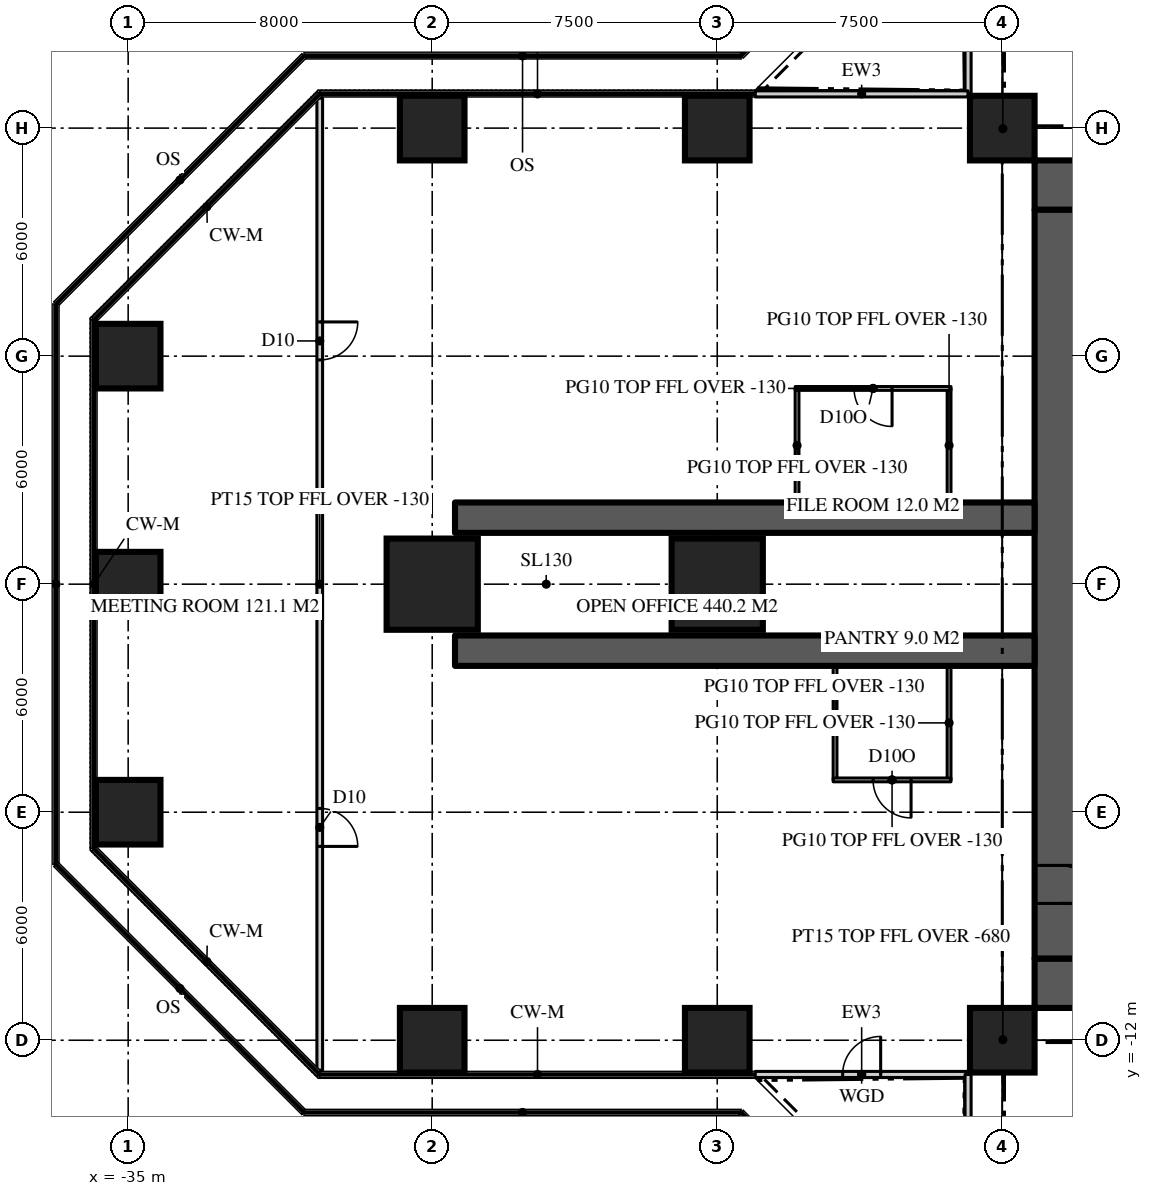
"""IFC4 building model, lengths in metres.
Left out: names, types, materials, properties, quantities, classifications, styles, units other than length and angle.
Written with IfcOpenShell. Run it as: python <this file> out.ifc"""

import sys

from ifc_helpers import new_model, si_unit, direction, frame, frame_2d, origin, origin_2d, place, context, subcontext, project, spatial, rectangle, extrude, element, fill, save


model = new_model("IFC4")
c1 = context("Model", 3, precision=1e-05, world=origin(), true_north=direction((0.0, 1.0)))
c2 = subcontext(c1, "Body", "Model", "MODEL_VIEW")
j1 = project(units=[si_unit("LENGTHUNIT", "METRE"), si_unit("PLANEANGLEUNIT", "RADIAN")], contexts=[c1])
p1 = place(None, origin())
s1 = spatial("IfcSite", under=j1, at=p1, CompositionType="ELEMENT")
p2 = place(p1, origin())
s2 = spatial("IfcBuilding", under=s1, at=p2, CompositionType="ELEMENT")
p3 = place(p2, frame((0.0, 0.0, 124.2)))
s3 = spatial("IfcBuildingStorey", under=s2, at=p3, CompositionType="ELEMENT", Elevation=124.2)
p4 = place(p3, frame((-11.15, 10.5, 0.0), z_axis=(0.0, 0.0, 1.0), x_axis=(1.0, 0.0, 0.0)))
e1 = element("IfcWall", 1, at=p4, inside=s3, PredefinedType="SHEAR", context=c2, shape_type="SweptSolid", body=[
    extrude(rectangle(XDim=22.3, YDim=1.3, at=frame_2d((11.15, 0.0))), origin(), (0.0, 0.0, 1.0), 3.9),
])
p5 = place(p4, frame((4.25, 0.0, 0.0)))
e2 = element("IfcOpeningElement", 2, at=p5, cuts=e1, PredefinedType="OPENING", context=c2, shape_type="SweptSolid", body=[
    extrude(rectangle(XDim=1.8, YDim=2.2, at=frame_2d((0.9, 1.1))), frame((0.0, 0.66, 0.0), z_axis=(0.0, -1.0, 0.0), x_axis=(1.0, 0.0, 0.0)), (0.0, 0.0, 1.0), 1.32),
])
p6 = place(p4, frame((16.25, 0.0, 0.0)))
e3 = element("IfcOpeningElement", 3, at=p6, cuts=e1, PredefinedType="OPENING", context=c2, shape_type="SweptSolid", body=[
    extrude(rectangle(XDim=1.8, YDim=2.2, at=frame_2d((0.9, 1.1))), frame((0.0, 0.66, 0.0), z_axis=(0.0, -1.0, 0.0), x_axis=(1.0, 0.0, 0.0)), (0.0, 0.0, 1.0), 1.32),
])
p7 = place(p3, frame((11.15, -10.5, 0.0), z_axis=(0.0, 0.0, 1.0), x_axis=(-1.0, 0.0, 0.0)))
e4 = element("IfcWall", 4, at=p7, inside=s3, PredefinedType="SHEAR", context=c2, shape_type="SweptSolid", body=[
    extrude(rectangle(XDim=22.3, YDim=1.3, at=frame_2d((11.15, 0.0))), origin(), (0.0, 0.0, 1.0), 3.9),
])
p8 = place(p7, frame((16.25, 0.0, 0.0)))
e5 = element("IfcOpeningElement", 5, at=p8, cuts=e4, PredefinedType="OPENING", context=c2, shape_type="SweptSolid", body=[
    extrude(rectangle(XDim=1.8, YDim=2.2, at=frame_2d((0.9, 1.1))), frame((0.0, 0.66, 0.0), z_axis=(0.0, -1.0, 0.0), x_axis=(1.0, 0.0, 0.0)), (0.0, 0.0, 1.0), 1.32),
])
p9 = place(p7, frame((4.25, 0.0, 0.0)))
e6 = element("IfcOpeningElement", 6, at=p9, cuts=e4, PredefinedType="OPENING", context=c2, shape_type="SweptSolid", body=[
    extrude(rectangle(XDim=1.8, YDim=2.2, at=frame_2d((0.9, 1.1))), frame((0.0, 0.66, 0.0), z_axis=(0.0, -1.0, 0.0), x_axis=(1.0, 0.0, 0.0)), (0.0, 0.0, 1.0), 1.32),
])
p10 = place(p3, frame((-10.5, 9.85, 0.0), z_axis=(0.0, 0.0, 1.0), x_axis=(0.0, -1.0, 0.0)))
e7 = element("IfcWall", 7, at=p10, inside=s3, PredefinedType="SHEAR", context=c2, shape_type="SweptSolid", body=[
    extrude(rectangle(XDim=19.7, YDim=1.3, at=frame_2d((9.85, 0.0))), origin(), (0.0, 0.0, 1.0), 3.9),
])
p11 = place(p10, frame((17.25, 0.0, 0.0)))
e8 = element("IfcOpeningElement", 8, at=p11, cuts=e7, PredefinedType="OPENING", context=c2, shape_type="SweptSolid", body=[
    extrude(rectangle(XDim=1.0, YDim=2.2, at=frame_2d((0.5, 1.1))), frame((0.0, 0.66, 0.0), z_axis=(0.0, -1.0, 0.0), x_axis=(1.0, 0.0, 0.0)), (0.0, 0.0, 1.0), 1.32),
])
for number, where, z_axis, x_axis in (
    (9, (-11.15, 1.75, 0.0), (0.0, 0.0, 1.0), (-1.0, 0.0, 0.0)),
    (10, (-11.15, -1.75, 0.0), (0.0, 0.0, 1.0), (-1.0, 0.0, 0.0)),
):
    element("IfcWall", number, at=place(p3, frame(where, z_axis=z_axis, x_axis=x_axis)), inside=s3, PredefinedType="SHEAR", context=c2, shape_type="SweptSolid", body=[
        extrude(rectangle(XDim=15.25, YDim=0.8, at=frame_2d((7.625, 0.0))), origin(), (0.0, 0.0, 1.0), 3.9),
    ])
for number, where, z_axis, x_axis in (
    (11, (-27.0, -12.0, 0.0), (0.0, 0.0, 1.0), (1.0, 0.0, 0.0)),
    (12, (-19.5, -12.0, 0.0), (0.0, 0.0, 1.0), (1.0, 0.0, 0.0)),
    (13, (-12.0, -12.0, 0.0), (0.0, 0.0, 1.0), (1.0, 0.0, 0.0)),
    (14, (-35.0, -6.0, 0.0), (0.0, 0.0, 1.0), (1.0, 0.0, 0.0)),
    (15, (-35.0, 0.0, 0.0), (0.0, 0.0, 1.0), (1.0, 0.0, 0.0)),
):
    element("IfcColumn", number, at=place(p3, frame(where, z_axis=z_axis, x_axis=x_axis)), inside=s3, PredefinedType="COLUMN", context=c2, shape_type="SweptSolid", body=[
        extrude(rectangle(XDim=1.7, YDim=1.7, at=origin_2d()), origin(), (0.0, 0.0, 1.0), 3.9),
    ])
for number, where, z_axis, x_axis in (
    (16, (-27.0, 0.0, 0.0), (0.0, 0.0, 1.0), (1.0, 0.0, 0.0)),
    (17, (-19.5, 0.0, 0.0), (0.0, 0.0, 1.0), (1.0, 0.0, 0.0)),
):
    element("IfcColumn", number, at=place(p3, frame(where, z_axis=z_axis, x_axis=x_axis)), inside=s3, PredefinedType="COLUMN", context=c2, shape_type="SweptSolid", body=[
        extrude(rectangle(XDim=2.4, YDim=2.4, at=origin_2d()), origin(), (0.0, 0.0, 1.0), 3.9),
    ])
for number, where, z_axis, x_axis in (
    (18, (-35.0, 6.0, 0.0), (0.0, 0.0, 1.0), (1.0, 0.0, 0.0)),
    (19, (-27.0, 12.0, 0.0), (0.0, 0.0, 1.0), (1.0, 0.0, 0.0)),
    (20, (-19.5, 12.0, 0.0), (0.0, 0.0, 1.0), (1.0, 0.0, 0.0)),
    (21, (-12.0, 12.0, 0.0), (0.0, 0.0, 1.0), (1.0, 0.0, 0.0)),
):
    element("IfcColumn", number, at=place(p3, frame(where, z_axis=z_axis, x_axis=x_axis)), inside=s3, PredefinedType="COLUMN", context=c2, shape_type="SweptSolid", body=[
        extrude(rectangle(XDim=1.7, YDim=1.7, at=origin_2d()), origin(), (0.0, 0.0, 1.0), 3.9),
    ])
p12 = place(p3, frame((-12.9, 18.5, 0.0), z_axis=(0.0, 0.0, 1.0), x_axis=(0.0, -1.0, 0.0)))
e22 = element("IfcWall", 22, at=p12, inside=s3, PredefinedType="SOLIDWALL", context=c2, shape_type="SweptSolid", body=[
    extrude(rectangle(XDim=5.6, YDim=0.16, at=frame_2d((2.8, 0.0))), origin(), (0.0, 0.0, 1.0), 3.77),
])
p13 = place(p12, frame((2.3, 0.0, 0.0)))
e23 = element("IfcOpeningElement", 23, at=p13, cuts=e22, PredefinedType="OPENING", context=c2, shape_type="SweptSolid", body=[
    extrude(rectangle(XDim=1.0, YDim=2.2, at=frame_2d((0.5, 1.1))), frame((0.0, 0.09, 0.0), z_axis=(0.0, -1.0, 0.0), x_axis=(1.0, 0.0, 0.0)), (0.0, 0.0, 1.0), 0.18),
])
p14 = place(p3, frame((-12.9, 12.9, 0.0), z_axis=(0.0, 0.0, 1.0), x_axis=(-1.0, 0.0, 0.0)))
e24 = element("IfcWall", 24, at=p14, inside=s3, PredefinedType="SOLIDWALL", context=c2, shape_type="SweptSolid", body=[
    extrude(rectangle(XDim=5.6, YDim=0.16, at=frame_2d((2.8, 0.0))), origin(), (0.0, 0.0, 1.0), 3.77),
])
p15 = place(p3, frame((-18.5, -12.9, 0.0), z_axis=(0.0, 0.0, 1.0), x_axis=(1.0, 0.0, 0.0)))
e25 = element("IfcWall", 25, at=p15, inside=s3, PredefinedType="SOLIDWALL", context=c2, shape_type="SweptSolid", body=[
    extrude(rectangle(XDim=5.6, YDim=0.16, at=frame_2d((2.8, 0.0))), origin(), (0.0, 0.0, 1.0), 3.77),
])
p16 = place(p15, frame((2.3, 0.0, 0.0)))
e26 = element("IfcOpeningElement", 26, at=p16, cuts=e25, PredefinedType="OPENING", context=c2, shape_type="SweptSolid", body=[
    extrude(rectangle(XDim=1.0, YDim=2.2, at=frame_2d((0.5, 1.1))), frame((0.0, 0.09, 0.0), z_axis=(0.0, -1.0, 0.0), x_axis=(1.0, 0.0, 0.0)), (0.0, 0.0, 1.0), 0.18),
])
p17 = place(p3, frame((-12.9, -12.9, 0.0), z_axis=(0.0, 0.0, 1.0), x_axis=(0.0, -1.0, 0.0)))
e27 = element("IfcWall", 27, at=p17, inside=s3, PredefinedType="SOLIDWALL", context=c2, shape_type="SweptSolid", body=[
    extrude(rectangle(XDim=5.6, YDim=0.16, at=frame_2d((2.8, 0.0))), origin(), (0.0, 0.0, 1.0), 3.77),
])
p18 = place(p3, frame((-29.959, 12.786, 0.0), z_axis=(0.0, 0.0, 1.0), x_axis=(0.0, -1.0, 0.0)))
e28 = element("IfcWall", 28, at=p18, inside=s3, PredefinedType="PARTITIONING", context=c2, shape_type="SweptSolid", body=[
    extrude(rectangle(XDim=25.573, YDim=0.15, at=frame_2d((12.786, 0.0))), origin(), (0.0, 0.0, 1.0), 3.77),
])
p19 = place(p18, frame((18.687, 0.0, 0.0)))
e29 = element("IfcOpeningElement", 29, at=p19, cuts=e28, PredefinedType="OPENING", context=c2, shape_type="SweptSolid", body=[
    extrude(rectangle(XDim=1.0, YDim=2.2, at=frame_2d((0.5, 1.1))), frame((0.0, 0.085, 0.0), z_axis=(0.0, -1.0, 0.0), x_axis=(1.0, 0.0, 0.0)), (0.0, 0.0, 1.0), 0.17),
])
p20 = place(p18, frame((5.886, 0.0, 0.0)))
e30 = element("IfcOpeningElement", 30, at=p20, cuts=e28, PredefinedType="OPENING", context=c2, shape_type="SweptSolid", body=[
    extrude(rectangle(XDim=1.0, YDim=2.2, at=frame_2d((0.5, 1.1))), frame((0.0, 0.085, 0.0), z_axis=(0.0, -1.0, 0.0), x_axis=(1.0, 0.0, 0.0)), (0.0, 0.0, 1.0), 0.17),
])
for number, where, z_axis, x_axis in (
    (31, (-13.4, -2.15, 0.0), (0.0, 0.0, 1.0), (0.0, -1.0, 0.0)),
    (32, (-16.4, -2.15, 0.0), (0.0, 0.0, 1.0), (0.0, -1.0, 0.0)),
):
    element("IfcWall", number, at=place(p3, frame(where, z_axis=z_axis, x_axis=x_axis)), inside=s3, PredefinedType="PARTITIONING", context=c2, shape_type="SweptSolid", body=[
        extrude(rectangle(XDim=3.0, YDim=0.1, at=frame_2d((1.5, 0.0))), origin(), (0.0, 0.0, 1.0), 3.77),
    ])
p21 = place(p3, frame((-13.35, -5.15, 0.0), z_axis=(0.0, 0.0, 1.0), x_axis=(-1.0, 0.0, 0.0)))
e33 = element("IfcWall", 33, at=p21, inside=s3, PredefinedType="PARTITIONING", context=c2, shape_type="SweptSolid", body=[
    extrude(rectangle(XDim=3.1, YDim=0.1, at=frame_2d((1.55, 0.0))), origin(), (0.0, 0.0, 1.0), 3.77),
])
p22 = place(p21, frame((1.05, 0.0, 0.0)))
e34 = element("IfcOpeningElement", 34, at=p22, cuts=e33, PredefinedType="OPENING", context=c2, shape_type="SweptSolid", body=[
    extrude(rectangle(XDim=1.0, YDim=2.2, at=frame_2d((0.5, 1.1))), frame((0.0, 0.06, 0.0), z_axis=(0.0, -1.0, 0.0), x_axis=(1.0, 0.0, 0.0)), (0.0, 0.0, 1.0), 0.12),
])
for number, where, z_axis, x_axis in (
    (35, (-13.4, 2.15, 0.0), (0.0, 0.0, 1.0), (0.0, 1.0, 0.0)),
    (36, (-17.4, 2.15, 0.0), (0.0, 0.0, 1.0), (0.0, 1.0, 0.0)),
):
    element("IfcWall", number, at=place(p3, frame(where, z_axis=z_axis, x_axis=x_axis)), inside=s3, PredefinedType="PARTITIONING", context=c2, shape_type="SweptSolid", body=[
        extrude(rectangle(XDim=3.0, YDim=0.1, at=frame_2d((1.5, 0.0))), origin(), (0.0, 0.0, 1.0), 3.77),
    ])
p23 = place(p3, frame((-13.35, 5.15, 0.0), z_axis=(0.0, 0.0, 1.0), x_axis=(-1.0, 0.0, 0.0)))
e37 = element("IfcWall", 37, at=p23, inside=s3, PredefinedType="PARTITIONING", context=c2, shape_type="SweptSolid", body=[
    extrude(rectangle(XDim=4.1, YDim=0.1, at=frame_2d((2.05, 0.0))), origin(), (0.0, 0.0, 1.0), 3.77),
])
p24 = place(p23, frame((1.55, 0.0, 0.0)))
e38 = element("IfcOpeningElement", 38, at=p24, cuts=e37, PredefinedType="OPENING", context=c2, shape_type="SweptSolid", body=[
    extrude(rectangle(XDim=1.0, YDim=2.2, at=frame_2d((0.5, 1.1))), frame((0.0, 0.06, 0.0), z_axis=(0.0, -1.0, 0.0), x_axis=(1.0, 0.0, 0.0)), (0.0, 0.0, 1.0), 0.12),
])
for number, where, z_axis, x_axis in (
    (39, (-11.15, 11.15, 0.0), (0.0, 0.0, 1.0), (-0.707, 0.707, 0.0)),
    (40, (-11.15, -11.15, 0.0), (0.0, 0.0, 1.0), (-0.707, -0.707, 0.0)),
):
    element("IfcWall", number, at=place(p3, frame(where, z_axis=z_axis, x_axis=x_axis)), inside=s3, PredefinedType="PARTITIONING", context=c2, shape_type="SweptSolid", body=[
        extrude(rectangle(XDim=2.362, YDim=0.15, at=frame_2d((1.181, 0.0))), origin(), (0.0, 0.0, 1.0), 3.22),
    ])
p25 = place(p16, origin())
e41 = element("IfcDoor", 41, at=p25, inside=s3, OperationType="SINGLE_SWING_RIGHT", PredefinedType="DOOR", context=c2, shape_type="SweptSolid", body=[
    extrude(rectangle(XDim=1.0, YDim=2.2, at=frame_2d((0.5, 1.1))), frame((0.0, 0.025, 0.0), z_axis=(0.0, -1.0, 0.0), x_axis=(1.0, 0.0, 0.0)), (0.0, 0.0, 1.0), 0.05),
])
fill(e26, e41)
p26 = place(p11, origin())
e42 = element("IfcDoor", 42, at=p26, inside=s3, OperationType="SINGLE_SWING_RIGHT", PredefinedType="DOOR", context=c2, shape_type="SweptSolid", body=[
    extrude(rectangle(XDim=1.0, YDim=2.2, at=frame_2d((0.5, 1.1))), frame((0.0, 0.025, 0.0), z_axis=(0.0, -1.0, 0.0), x_axis=(1.0, 0.0, 0.0)), (0.0, 0.0, 1.0), 0.05),
])
fill(e8, e42)
p27 = place(p19, origin())
e43 = element("IfcDoor", 43, at=p27, inside=s3, OperationType="SINGLE_SWING_RIGHT", PredefinedType="DOOR", context=c2, shape_type="SweptSolid", body=[
    extrude(rectangle(XDim=1.0, YDim=2.2, at=frame_2d((0.5, 1.1))), frame((0.0, 0.025, 0.0), z_axis=(0.0, -1.0, 0.0), x_axis=(1.0, 0.0, 0.0)), (0.0, 0.0, 1.0), 0.05),
])
fill(e29, e43)
p28 = place(p20, origin())
e44 = element("IfcDoor", 44, at=p28, inside=s3, OperationType="SINGLE_SWING_LEFT", PredefinedType="DOOR", context=c2, shape_type="SweptSolid", body=[
    extrude(rectangle(XDim=1.0, YDim=2.2, at=frame_2d((0.5, 1.1))), frame((0.0, 0.025, 0.0), z_axis=(0.0, -1.0, 0.0), x_axis=(1.0, 0.0, 0.0)), (0.0, 0.0, 1.0), 0.05),
])
fill(e30, e44)
p29 = place(p22, origin())
e45 = element("IfcDoor", 45, at=p29, inside=s3, OperationType="SINGLE_SWING_LEFT", PredefinedType="DOOR", context=c2, shape_type="SweptSolid", body=[
    extrude(rectangle(XDim=1.0, YDim=2.2, at=frame_2d((0.5, 1.1))), frame((0.0, 0.025, 0.0), z_axis=(0.0, -1.0, 0.0), x_axis=(1.0, 0.0, 0.0)), (0.0, 0.0, 1.0), 0.05),
])
fill(e34, e45)
p30 = place(p24, origin())
e46 = element("IfcDoor", 46, at=p30, inside=s3, OperationType="SINGLE_SWING_LEFT", PredefinedType="DOOR", context=c2, shape_type="SweptSolid", body=[
    extrude(rectangle(XDim=1.0, YDim=2.2, at=frame_2d((0.5, 1.1))), frame((0.0, 0.025, 0.0), z_axis=(0.0, -1.0, 0.0), x_axis=(1.0, 0.0, 0.0)), (0.0, 0.0, 1.0), 0.05),
])
fill(e38, e46)
save(model, sys.argv[1])
